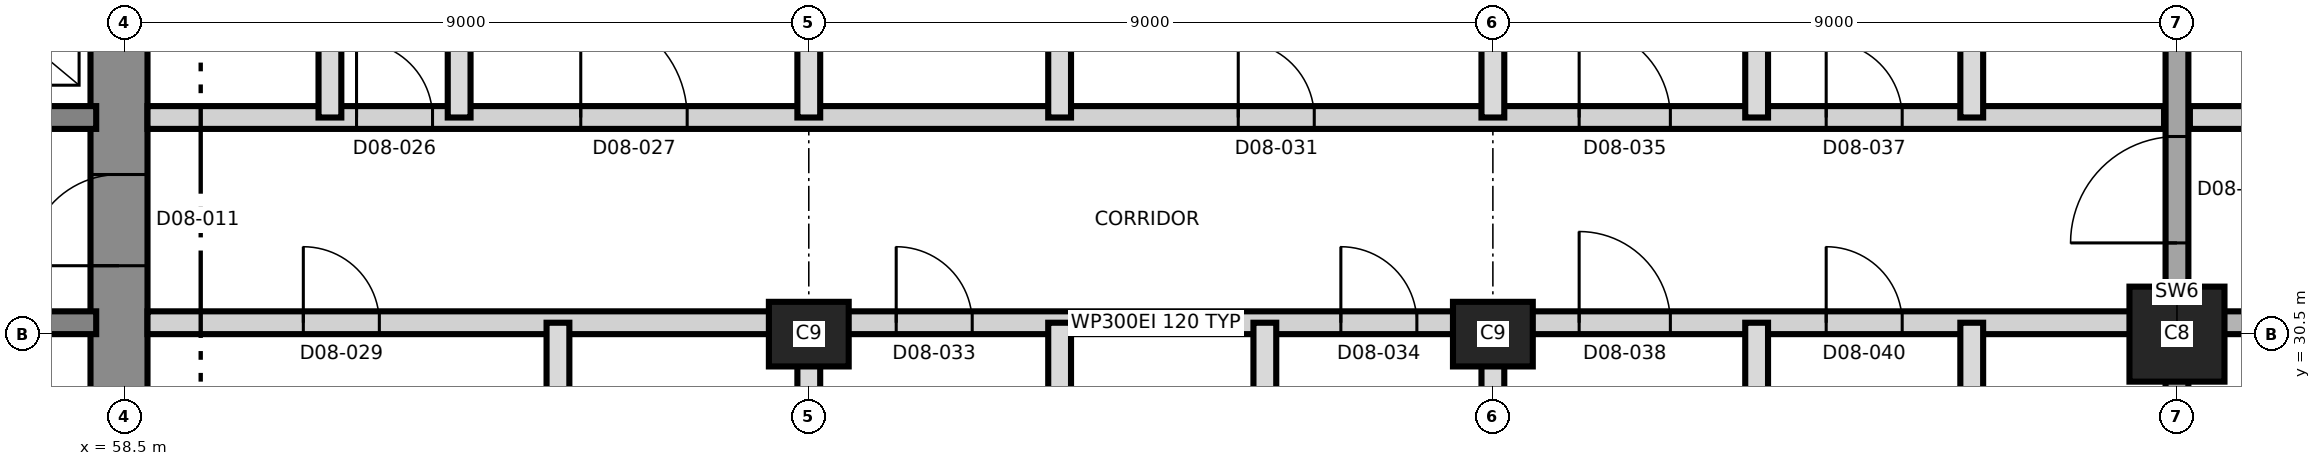
"""IFC4 building model, lengths in metres.
Left out: names, types, materials, properties, quantities, classifications, styles, units other than length and angle.
Written with IfcOpenShell. Run it as: python <this file> out.ifc"""

import sys

from ifc_helpers import new_model, si_unit, direction, frame, frame_2d, origin, origin_2d, place, context, subcontext, project, spatial, rectangle, extrude, element, fill, save


model = new_model("IFC4")
c1 = context("Model", 3, precision=1e-05, world=origin(), true_north=direction((0.0, 1.0)))
c2 = subcontext(c1, "Body", "Model", "MODEL_VIEW")
j1 = project(units=[si_unit("LENGTHUNIT", "METRE"), si_unit("PLANEANGLEUNIT", "RADIAN")], contexts=[c1])
p1 = place(None, origin())
s1 = spatial("IfcSite", under=j1, at=p1, CompositionType="ELEMENT")
p2 = place(p1, origin())
s2 = spatial("IfcBuilding", under=s1, at=p2, CompositionType="ELEMENT")
p3 = place(p2, frame((0.0, 0.0, 98.2)))
s3 = spatial("IfcBuildingStorey", under=s2, at=p3, CompositionType="ELEMENT", Elevation=98.2)
p4 = place(p3, frame((58.425, 21.125, 0.0), z_axis=(0.0, 0.0, 1.0), x_axis=(0.0, 1.0, 0.0)))
e1 = element("IfcWall", 1, at=p4, inside=s3, PredefinedType="SHEAR", context=c2, shape_type="SweptSolid", body=[
    extrude(rectangle(XDim=18.75, YDim=0.75, at=frame_2d((9.375, 0.0))), origin(), (0.0, 0.0, 1.0), 3.7),
])
p5 = place(p4, frame((10.275, 0.0, 0.0)))
e2 = element("IfcOpeningElement", 2, at=p5, cuts=e1, PredefinedType="OPENING", context=c2, shape_type="SweptSolid", body=[
    extrude(rectangle(XDim=1.2, YDim=2.1, at=frame_2d((0.6, 1.05))), frame((0.0, 0.385, 0.0), z_axis=(0.0, -1.0, 0.0), x_axis=(1.0, 0.0, 0.0)), (0.0, 0.0, 1.0), 0.77),
])
p6 = place(p3, frame((31.875, 30.65, 0.0), z_axis=(0.0, 0.0, 1.0), x_axis=(1.0, 0.0, 0.0)))
e3 = element("IfcWall", 3, at=p6, inside=s3, PredefinedType="SHEAR", context=c2, shape_type="SweptSolid", body=[
    extrude(rectangle(XDim=26.25, YDim=0.3, at=frame_2d((13.125, 0.0))), origin(), (0.0, 0.0, 1.0), 3.7),
])
p7 = place(p6, frame((24.625, 0.0, 0.0)))
e4 = element("IfcOpeningElement", 4, at=p7, cuts=e3, PredefinedType="OPENING", context=c2, shape_type="SweptSolid", body=[
    extrude(rectangle(XDim=1.0, YDim=2.1, at=frame_2d((0.5, 1.05))), frame((0.0, 0.16, 0.0), z_axis=(0.0, -1.0, 0.0), x_axis=(1.0, 0.0, 0.0)), (0.0, 0.0, 1.0), 0.32),
])
p8 = place(p6, frame((11.425, 0.0, 0.0)))
e5 = element("IfcOpeningElement", 5, at=p8, cuts=e3, PredefinedType="OPENING", context=c2, shape_type="SweptSolid", body=[
    extrude(rectangle(XDim=1.0, YDim=2.1, at=frame_2d((0.5, 1.05))), frame((0.0, 0.16, 0.0), z_axis=(0.0, -1.0, 0.0), x_axis=(1.0, 0.0, 0.0)), (0.0, 0.0, 1.0), 0.32),
])
p9 = place(p3, frame((31.875, 33.35, 0.0), z_axis=(0.0, 0.0, 1.0), x_axis=(1.0, 0.0, 0.0)))
e6 = element("IfcWall", 6, at=p9, inside=s3, PredefinedType="SHEAR", context=c2, shape_type="SweptSolid", body=[
    extrude(rectangle(XDim=26.25, YDim=0.3, at=frame_2d((13.125, 0.0))), origin(), (0.0, 0.0, 1.0), 3.7),
])
p10 = place(p9, frame((13.775, 0.0, 0.0)))
e7 = element("IfcOpeningElement", 7, at=p10, cuts=e6, PredefinedType="OPENING", context=c2, shape_type="SweptSolid", body=[
    extrude(rectangle(XDim=1.4, YDim=2.1, at=frame_2d((0.7, 1.05))), frame((0.0, 0.16, 0.0), z_axis=(0.0, -1.0, 0.0), x_axis=(1.0, 0.0, 0.0)), (0.0, 0.0, 1.0), 0.32),
])
p11 = place(p9, frame((5.25, 0.0, 0.0)))
e8 = element("IfcOpeningElement", 8, at=p11, cuts=e6, PredefinedType="OPENING", context=c2, shape_type="SweptSolid", body=[
    extrude(rectangle(XDim=1.2, YDim=2.1, at=frame_2d((0.6, 1.05))), frame((0.0, 0.16, 0.0), z_axis=(0.0, -1.0, 0.0), x_axis=(1.0, 0.0, 0.0)), (0.0, 0.0, 1.0), 0.32),
])
p12 = place(p9, frame((19.8, 0.0, 0.0)))
e9 = element("IfcOpeningElement", 9, at=p12, cuts=e6, PredefinedType="OPENING", context=c2, shape_type="SweptSolid", body=[
    extrude(rectangle(XDim=1.2, YDim=2.1, at=frame_2d((0.6, 1.05))), frame((0.0, 0.16, 0.0), z_axis=(0.0, -1.0, 0.0), x_axis=(1.0, 0.0, 0.0)), (0.0, 0.0, 1.0), 0.32),
])
for number, where, z_axis, x_axis in (
    (10, (67.5, 30.5, 0.0), (0.0, 0.0, 1.0), (1.0, 0.0, 0.0)),
    (11, (76.5, 30.5, 0.0), (0.0, 0.0, 1.0), (1.0, 0.0, 0.0)),
):
    element("IfcColumn", number, at=place(p3, frame(where, z_axis=z_axis, x_axis=x_axis)), inside=s3, PredefinedType="COLUMN", context=c2, shape_type="SweptSolid", body=[
        extrude(rectangle(XDim=1.05, YDim=0.85, at=origin_2d()), origin(), (0.0, 0.0, 1.0), 3.7),
    ])
p13 = place(p3, frame((85.5, 30.5, 0.0), z_axis=(0.0, 0.0, 1.0), x_axis=(1.0, 0.0, 0.0)))
e12 = element("IfcColumn", 12, at=p13, inside=s3, PredefinedType="COLUMN", context=c2, shape_type="SweptSolid", body=[
    extrude(rectangle(XDim=1.25, YDim=1.25, at=origin_2d()), origin(), (0.0, 0.0, 1.0), 3.7),
])
p14 = place(p3, frame((85.5, 21.53, 0.0), z_axis=(0.0, 0.0, 1.0), x_axis=(0.0, 1.0, 0.0)))
e13 = element("IfcWall", 13, at=p14, inside=s3, PredefinedType="SHEAR", context=c2, shape_type="SweptSolid", body=[
    extrude(rectangle(XDim=17.94, YDim=0.3, at=frame_2d((8.97, 0.0))), origin(), (0.0, 0.0, 1.0), 3.7),
])
p15 = place(p14, frame((10.17, 0.0, 0.0)))
e14 = element("IfcOpeningElement", 14, at=p15, cuts=e13, PredefinedType="OPENING", context=c2, shape_type="SweptSolid", body=[
    extrude(rectangle(XDim=1.4, YDim=2.1, at=frame_2d((0.7, 1.05))), frame((0.0, 0.16, 0.0), z_axis=(0.0, -1.0, 0.0), x_axis=(1.0, 0.0, 0.0)), (0.0, 0.0, 1.0), 0.32),
])
p16 = place(p3, frame((58.8, 30.65, 0.0), z_axis=(0.0, 0.0, 1.0), x_axis=(1.0, 0.0, 0.0)))
e15 = element("IfcWall", 15, at=p16, inside=s3, PredefinedType="PARTITIONING", context=c2, shape_type="SweptSolid", body=[
    extrude(rectangle(XDim=26.53, YDim=0.3, at=frame_2d((13.265, 0.0))), origin(), (0.0, 0.0, 1.0), 3.4),
])
p17 = place(p16, frame((2.05, 0.0, 0.0)))
e16 = element("IfcOpeningElement", 16, at=p17, cuts=e15, PredefinedType="OPENING", context=c2, shape_type="SweptSolid", body=[
    extrude(rectangle(XDim=1.0, YDim=2.4, at=frame_2d((0.5, 1.2))), frame((0.0, 0.16, 0.0), z_axis=(0.0, -1.0, 0.0), x_axis=(1.0, 0.0, 0.0)), (0.0, 0.0, 1.0), 0.32),
])
p18 = place(p16, frame((9.85, 0.0, 0.0)))
e17 = element("IfcOpeningElement", 17, at=p18, cuts=e15, PredefinedType="OPENING", context=c2, shape_type="SweptSolid", body=[
    extrude(rectangle(XDim=1.0, YDim=2.1, at=frame_2d((0.5, 1.05))), frame((0.0, 0.16, 0.0), z_axis=(0.0, -1.0, 0.0), x_axis=(1.0, 0.0, 0.0)), (0.0, 0.0, 1.0), 0.32),
])
p19 = place(p16, frame((15.7, 0.0, 0.0)))
e18 = element("IfcOpeningElement", 18, at=p19, cuts=e15, PredefinedType="OPENING", context=c2, shape_type="SweptSolid", body=[
    extrude(rectangle(XDim=1.0, YDim=2.1, at=frame_2d((0.5, 1.05))), frame((0.0, 0.16, 0.0), z_axis=(0.0, -1.0, 0.0), x_axis=(1.0, 0.0, 0.0)), (0.0, 0.0, 1.0), 0.32),
])
p20 = place(p16, frame((18.835, 0.0, 0.0)))
e19 = element("IfcOpeningElement", 19, at=p20, cuts=e15, PredefinedType="OPENING", context=c2, shape_type="SweptSolid", body=[
    extrude(rectangle(XDim=1.2, YDim=2.1, at=frame_2d((0.6, 1.05))), frame((0.0, 0.16, 0.0), z_axis=(0.0, -1.0, 0.0), x_axis=(1.0, 0.0, 0.0)), (0.0, 0.0, 1.0), 0.32),
])
p21 = place(p16, frame((22.085, 0.0, 0.0)))
e20 = element("IfcOpeningElement", 20, at=p21, cuts=e15, PredefinedType="OPENING", context=c2, shape_type="SweptSolid", body=[
    extrude(rectangle(XDim=1.0, YDim=2.1, at=frame_2d((0.5, 1.05))), frame((0.0, 0.16, 0.0), z_axis=(0.0, -1.0, 0.0), x_axis=(1.0, 0.0, 0.0)), (0.0, 0.0, 1.0), 0.32),
])
p22 = place(p3, frame((85.67, 30.65, 0.0), z_axis=(0.0, 0.0, 1.0), x_axis=(1.0, 0.0, 0.0)))
e21 = element("IfcWall", 21, at=p22, inside=s3, PredefinedType="SHEAR", context=c2, shape_type="SweptSolid", body=[
    extrude(rectangle(XDim=8.8, YDim=0.3, at=frame_2d((4.4, 0.0))), origin(), (0.0, 0.0, 1.0), 3.4),
])
p23 = place(p22, frame((2.08, 0.0, 0.0)))
e22 = element("IfcOpeningElement", 22, at=p23, cuts=e21, PredefinedType="OPENING", context=c2, shape_type="SweptSolid", body=[
    extrude(rectangle(XDim=1.2, YDim=2.1, at=frame_2d((0.6, 1.05))), frame((0.0, 0.16, 0.0), z_axis=(0.0, -1.0, 0.0), x_axis=(1.0, 0.0, 0.0)), (0.0, 0.0, 1.0), 0.32),
])
p24 = place(p22, frame((5.63, 0.0, 0.0)))
e23 = element("IfcOpeningElement", 23, at=p24, cuts=e21, PredefinedType="OPENING", context=c2, shape_type="SweptSolid", body=[
    extrude(rectangle(XDim=1.0, YDim=2.1, at=frame_2d((0.5, 1.05))), frame((0.0, 0.16, 0.0), z_axis=(0.0, -1.0, 0.0), x_axis=(1.0, 0.0, 0.0)), (0.0, 0.0, 1.0), 0.32),
])
p25 = place(p3, frame((58.8, 33.35, 0.0), z_axis=(0.0, 0.0, 1.0), x_axis=(1.0, 0.0, 0.0)))
e24 = element("IfcWall", 24, at=p25, inside=s3, PredefinedType="PARTITIONING", context=c2, shape_type="SweptSolid", body=[
    extrude(rectangle(XDim=26.53, YDim=0.3, at=frame_2d((13.265, 0.0))), origin(), (0.0, 0.0, 1.0), 3.4),
])
p26 = place(p25, frame((2.75, 0.0, 0.0)))
e25 = element("IfcOpeningElement", 25, at=p26, cuts=e24, PredefinedType="OPENING", context=c2, shape_type="SweptSolid", body=[
    extrude(rectangle(XDim=1.0, YDim=2.1, at=frame_2d((0.5, 1.05))), frame((0.0, 0.16, 0.0), z_axis=(0.0, -1.0, 0.0), x_axis=(1.0, 0.0, 0.0)), (0.0, 0.0, 1.0), 0.32),
])
p27 = place(p25, frame((5.7, 0.0, 0.0)))
e26 = element("IfcOpeningElement", 26, at=p27, cuts=e24, PredefinedType="OPENING", context=c2, shape_type="SweptSolid", body=[
    extrude(rectangle(XDim=1.4, YDim=2.1, at=frame_2d((0.7, 1.05))), frame((0.0, 0.16, 0.0), z_axis=(0.0, -1.0, 0.0), x_axis=(1.0, 0.0, 0.0)), (0.0, 0.0, 1.0), 0.32),
])
p28 = place(p25, frame((14.35, 0.0, 0.0)))
e27 = element("IfcOpeningElement", 27, at=p28, cuts=e24, PredefinedType="OPENING", context=c2, shape_type="SweptSolid", body=[
    extrude(rectangle(XDim=1.0, YDim=2.4, at=frame_2d((0.5, 1.2))), frame((0.0, 0.16, 0.0), z_axis=(0.0, -1.0, 0.0), x_axis=(1.0, 0.0, 0.0)), (0.0, 0.0, 1.0), 0.32),
])
p29 = place(p25, frame((18.835, 0.0, 0.0)))
e28 = element("IfcOpeningElement", 28, at=p29, cuts=e24, PredefinedType="OPENING", context=c2, shape_type="SweptSolid", body=[
    extrude(rectangle(XDim=1.2, YDim=2.1, at=frame_2d((0.6, 1.05))), frame((0.0, 0.16, 0.0), z_axis=(0.0, -1.0, 0.0), x_axis=(1.0, 0.0, 0.0)), (0.0, 0.0, 1.0), 0.32),
])
p30 = place(p25, frame((22.085, 0.0, 0.0)))
e29 = element("IfcOpeningElement", 29, at=p30, cuts=e24, PredefinedType="OPENING", context=c2, shape_type="SweptSolid", body=[
    extrude(rectangle(XDim=1.0, YDim=2.1, at=frame_2d((0.5, 1.05))), frame((0.0, 0.16, 0.0), z_axis=(0.0, -1.0, 0.0), x_axis=(1.0, 0.0, 0.0)), (0.0, 0.0, 1.0), 0.32),
])
p31 = place(p3, frame((85.67, 33.35, 0.0), z_axis=(0.0, 0.0, 1.0), x_axis=(1.0, 0.0, 0.0)))
e30 = element("IfcWall", 30, at=p31, inside=s3, PredefinedType="PARTITIONING", context=c2, shape_type="SweptSolid", body=[
    extrude(rectangle(XDim=8.685, YDim=0.3, at=frame_2d((4.343, 0.0))), origin(), (0.0, 0.0, 1.0), 3.4),
])
p32 = place(p31, frame((1.83, 0.0, 0.0)))
e31 = element("IfcOpeningElement", 31, at=p32, cuts=e30, PredefinedType="OPENING", context=c2, shape_type="SweptSolid", body=[
    extrude(rectangle(XDim=1.0, YDim=2.1, at=frame_2d((0.5, 1.05))), frame((0.0, 0.16, 0.0), z_axis=(0.0, -1.0, 0.0), x_axis=(1.0, 0.0, 0.0)), (0.0, 0.0, 1.0), 0.32),
])
p33 = place(p31, frame((5.63, 0.0, 0.0)))
e32 = element("IfcOpeningElement", 32, at=p33, cuts=e30, PredefinedType="OPENING", context=c2, shape_type="SweptSolid", body=[
    extrude(rectangle(XDim=1.0, YDim=2.1, at=frame_2d((0.5, 1.05))), frame((0.0, 0.16, 0.0), z_axis=(0.0, -1.0, 0.0), x_axis=(1.0, 0.0, 0.0)), (0.0, 0.0, 1.0), 0.32),
])
p34 = place(p3, frame((61.2, 33.35, 0.0), z_axis=(0.0, 0.0, 1.0), x_axis=(0.0, 1.0, 0.0)))
e33 = element("IfcWall", 33, at=p34, inside=s3, PredefinedType="PARTITIONING", context=c2, shape_type="SweptSolid", body=[
    extrude(rectangle(XDim=3.2, YDim=0.3, at=frame_2d((1.6, 0.0))), origin(), (0.0, 0.0, 1.0), 3.4),
])
p35 = place(p3, frame((62.9, 33.35, 0.0), z_axis=(0.0, 0.0, 1.0), x_axis=(0.0, 1.0, 0.0)))
e34 = element("IfcWall", 34, at=p35, inside=s3, PredefinedType="PARTITIONING", context=c2, shape_type="SweptSolid", body=[
    extrude(rectangle(XDim=6.3, YDim=0.3, at=frame_2d((3.15, 0.0))), origin(), (0.0, 0.0, 1.0), 3.4),
])
p36 = place(p3, frame((64.2, 27.15, 0.0), z_axis=(0.0, 0.0, 1.0), x_axis=(0.0, 1.0, 0.0)))
e35 = element("IfcWall", 35, at=p36, inside=s3, PredefinedType="PARTITIONING", context=c2, shape_type="SweptSolid", body=[
    extrude(rectangle(XDim=3.5, YDim=0.3, at=frame_2d((1.75, 0.0))), origin(), (0.0, 0.0, 1.0), 3.4),
])
p37 = place(p3, frame((67.5, 21.53, 0.0), z_axis=(0.0, 0.0, 1.0), x_axis=(0.0, 1.0, 0.0)))
e36 = element("IfcWall", 36, at=p37, inside=s3, PredefinedType="PARTITIONING", context=c2, shape_type="SweptSolid", body=[
    extrude(rectangle(XDim=9.12, YDim=0.3, at=frame_2d((4.56, 0.0))), origin(), (0.0, 0.0, 1.0), 3.4),
])
p38 = place(p3, frame((67.5, 33.35, 0.0), z_axis=(0.0, 0.0, 1.0), x_axis=(0.0, 1.0, 0.0)))
e37 = element("IfcWall", 37, at=p38, inside=s3, PredefinedType="PARTITIONING", context=c2, shape_type="SweptSolid", body=[
    extrude(rectangle(XDim=6.12, YDim=0.3, at=frame_2d((3.06, 0.0))), origin(), (0.0, 0.0, 1.0), 3.4),
])
p39 = place(p3, frame((70.8, 27.45, 0.0), z_axis=(0.0, 0.0, 1.0), x_axis=(0.0, 1.0, 0.0)))
e38 = element("IfcWall", 38, at=p39, inside=s3, PredefinedType="PARTITIONING", context=c2, shape_type="SweptSolid", body=[
    extrude(rectangle(XDim=3.2, YDim=0.3, at=frame_2d((1.6, 0.0))), origin(), (0.0, 0.0, 1.0), 3.4),
])
p40 = place(p3, frame((70.8, 33.35, 0.0), z_axis=(0.0, 0.0, 1.0), x_axis=(0.0, 1.0, 0.0)))
e39 = element("IfcWall", 39, at=p40, inside=s3, PredefinedType="PARTITIONING", context=c2, shape_type="SweptSolid", body=[
    extrude(rectangle(XDim=3.5, YDim=0.3, at=frame_2d((1.75, 0.0))), origin(), (0.0, 0.0, 1.0), 3.4),
])
for number, where, z_axis, x_axis in (
    (40, (73.5, 21.53, 0.0), (0.0, 0.0, 1.0), (0.0, 1.0, 0.0)),
    (41, (76.5, 21.53, 0.0), (0.0, 0.0, 1.0), (0.0, 1.0, 0.0)),
):
    element("IfcWall", number, at=place(p3, frame(where, z_axis=z_axis, x_axis=x_axis)), inside=s3, PredefinedType="PARTITIONING", context=c2, shape_type="SweptSolid", body=[
        extrude(rectangle(XDim=9.12, YDim=0.3, at=frame_2d((4.56, 0.0))), origin(), (0.0, 0.0, 1.0), 3.4),
    ])
p41 = place(p3, frame((76.5, 33.35, 0.0), z_axis=(0.0, 0.0, 1.0), x_axis=(0.0, 1.0, 0.0)))
e42 = element("IfcWall", 42, at=p41, inside=s3, PredefinedType="PARTITIONING", context=c2, shape_type="SweptSolid", body=[
    extrude(rectangle(XDim=6.12, YDim=0.3, at=frame_2d((3.06, 0.0))), origin(), (0.0, 0.0, 1.0), 3.4),
])
p42 = place(p3, frame((79.97, 21.53, 0.0), z_axis=(0.0, 0.0, 1.0), x_axis=(0.0, 1.0, 0.0)))
e43 = element("IfcWall", 43, at=p42, inside=s3, PredefinedType="PARTITIONING", context=c2, shape_type="SweptSolid", body=[
    extrude(rectangle(XDim=9.12, YDim=0.3, at=frame_2d((4.56, 0.0))), origin(), (0.0, 0.0, 1.0), 3.4),
])
p43 = place(p3, frame((79.97, 33.35, 0.0), z_axis=(0.0, 0.0, 1.0), x_axis=(0.0, 1.0, 0.0)))
e44 = element("IfcWall", 44, at=p43, inside=s3, PredefinedType="PARTITIONING", context=c2, shape_type="SweptSolid", body=[
    extrude(rectangle(XDim=6.3, YDim=0.3, at=frame_2d((3.15, 0.0))), origin(), (0.0, 0.0, 1.0), 3.4),
])
for number, where, z_axis, x_axis in (
    (45, (82.8, 27.45, 0.0), (0.0, 0.0, 1.0), (0.0, 1.0, 0.0)),
    (46, (82.8, 33.35, 0.0), (0.0, 0.0, 1.0), (0.0, 1.0, 0.0)),
):
    element("IfcWall", number, at=place(p3, frame(where, z_axis=z_axis, x_axis=x_axis)), inside=s3, PredefinedType="PARTITIONING", context=c2, shape_type="SweptSolid", body=[
        extrude(rectangle(XDim=3.2, YDim=0.3, at=frame_2d((1.6, 0.0))), origin(), (0.0, 0.0, 1.0), 3.4),
    ])
p44 = place(p5, origin())
e47 = element("IfcDoor", 47, at=p44, inside=s3, OperationType="SINGLE_SWING_LEFT", PredefinedType="DOOR", context=c2, shape_type="SweptSolid", body=[
    extrude(rectangle(XDim=1.2, YDim=2.1, at=frame_2d((0.6, 1.05))), frame((0.0, 0.025, 0.0), z_axis=(0.0, -1.0, 0.0), x_axis=(1.0, 0.0, 0.0)), (0.0, 0.0, 1.0), 0.05),
])
fill(e2, e47)
p45 = place(p26, origin())
e48 = element("IfcDoor", 48, at=p45, inside=s3, OperationType="SINGLE_SWING_LEFT", PredefinedType="DOOR", context=c2, shape_type="SweptSolid", body=[
    extrude(rectangle(XDim=1.0, YDim=2.1, at=frame_2d((0.5, 1.05))), frame((0.0, 0.025, 0.0), z_axis=(0.0, -1.0, 0.0), x_axis=(1.0, 0.0, 0.0)), (0.0, 0.0, 1.0), 0.05),
])
fill(e25, e48)
p46 = place(p27, origin())
e49 = element("IfcDoor", 49, at=p46, inside=s3, OperationType="SINGLE_SWING_RIGHT", PredefinedType="DOOR", context=c2, shape_type="SweptSolid", body=[
    extrude(rectangle(XDim=1.4, YDim=2.1, at=frame_2d((0.7, 1.05))), frame((0.0, 0.025, 0.0), z_axis=(0.0, -1.0, 0.0), x_axis=(1.0, 0.0, 0.0)), (0.0, 0.0, 1.0), 0.05),
])
fill(e26, e49)
p47 = place(p17, origin())
e50 = element("IfcDoor", 50, at=p47, inside=s3, OperationType="SINGLE_SWING_LEFT", PredefinedType="DOOR", context=c2, shape_type="SweptSolid", body=[
    extrude(rectangle(XDim=1.0, YDim=2.4, at=frame_2d((0.5, 1.2))), frame((0.0, 0.025, 0.0), z_axis=(0.0, -1.0, 0.0), x_axis=(1.0, 0.0, 0.0)), (0.0, 0.0, 1.0), 0.05),
])
fill(e16, e50)
p48 = place(p28, origin())
e51 = element("IfcDoor", 51, at=p48, inside=s3, OperationType="SINGLE_SWING_RIGHT", PredefinedType="DOOR", context=c2, shape_type="SweptSolid", body=[
    extrude(rectangle(XDim=1.0, YDim=2.4, at=frame_2d((0.5, 1.2))), frame((0.0, 0.025, 0.0), z_axis=(0.0, -1.0, 0.0), x_axis=(1.0, 0.0, 0.0)), (0.0, 0.0, 1.0), 0.05),
])
fill(e27, e51)
p49 = place(p18, origin())
e52 = element("IfcDoor", 52, at=p49, inside=s3, OperationType="SINGLE_SWING_LEFT", PredefinedType="DOOR", context=c2, shape_type="SweptSolid", body=[
    extrude(rectangle(XDim=1.0, YDim=2.1, at=frame_2d((0.5, 1.05))), frame((0.0, 0.025, 0.0), z_axis=(0.0, -1.0, 0.0), x_axis=(1.0, 0.0, 0.0)), (0.0, 0.0, 1.0), 0.05),
])
fill(e17, e52)
p50 = place(p19, origin())
e53 = element("IfcDoor", 53, at=p50, inside=s3, OperationType="SINGLE_SWING_LEFT", PredefinedType="DOOR", context=c2, shape_type="SweptSolid", body=[
    extrude(rectangle(XDim=1.0, YDim=2.1, at=frame_2d((0.5, 1.05))), frame((0.0, 0.025, 0.0), z_axis=(0.0, -1.0, 0.0), x_axis=(1.0, 0.0, 0.0)), (0.0, 0.0, 1.0), 0.05),
])
fill(e18, e53)
p51 = place(p29, origin())
e54 = element("IfcDoor", 54, at=p51, inside=s3, OperationType="SINGLE_SWING_LEFT", PredefinedType="DOOR", context=c2, shape_type="SweptSolid", body=[
    extrude(rectangle(XDim=1.2, YDim=2.1, at=frame_2d((0.6, 1.05))), frame((0.0, 0.025, 0.0), z_axis=(0.0, -1.0, 0.0), x_axis=(1.0, 0.0, 0.0)), (0.0, 0.0, 1.0), 0.05),
])
fill(e28, e54)
p52 = place(p30, origin())
e55 = element("IfcDoor", 55, at=p52, inside=s3, OperationType="SINGLE_SWING_RIGHT", PredefinedType="DOOR", context=c2, shape_type="SweptSolid", body=[
    extrude(rectangle(XDim=1.0, YDim=2.1, at=frame_2d((0.5, 1.05))), frame((0.0, 0.025, 0.0), z_axis=(0.0, -1.0, 0.0), x_axis=(1.0, 0.0, 0.0)), (0.0, 0.0, 1.0), 0.05),
])
fill(e29, e55)
p53 = place(p20, origin())
e56 = element("IfcDoor", 56, at=p53, inside=s3, OperationType="SINGLE_SWING_LEFT", PredefinedType="DOOR", context=c2, shape_type="SweptSolid", body=[
    extrude(rectangle(XDim=1.2, YDim=2.1, at=frame_2d((0.6, 1.05))), frame((0.0, 0.025, 0.0), z_axis=(0.0, -1.0, 0.0), x_axis=(1.0, 0.0, 0.0)), (0.0, 0.0, 1.0), 0.05),
])
fill(e19, e56)
p54 = place(p21, origin())
e57 = element("IfcDoor", 57, at=p54, inside=s3, OperationType="SINGLE_SWING_RIGHT", PredefinedType="DOOR", context=c2, shape_type="SweptSolid", body=[
    extrude(rectangle(XDim=1.0, YDim=2.1, at=frame_2d((0.5, 1.05))), frame((0.0, 0.025, 0.0), z_axis=(0.0, -1.0, 0.0), x_axis=(1.0, 0.0, 0.0)), (0.0, 0.0, 1.0), 0.05),
])
fill(e20, e57)
p55 = place(p15, origin())
e58 = element("IfcDoor", 58, at=p55, inside=s3, OperationType="SINGLE_SWING_RIGHT", PredefinedType="DOOR", context=c2, shape_type="SweptSolid", body=[
    extrude(rectangle(XDim=1.4, YDim=2.1, at=frame_2d((0.7, 1.05))), frame((0.0, 0.025, 0.0), z_axis=(0.0, -1.0, 0.0), x_axis=(1.0, 0.0, 0.0)), (0.0, 0.0, 1.0), 0.05),
])
fill(e14, e58)
save(model, sys.argv[1])
